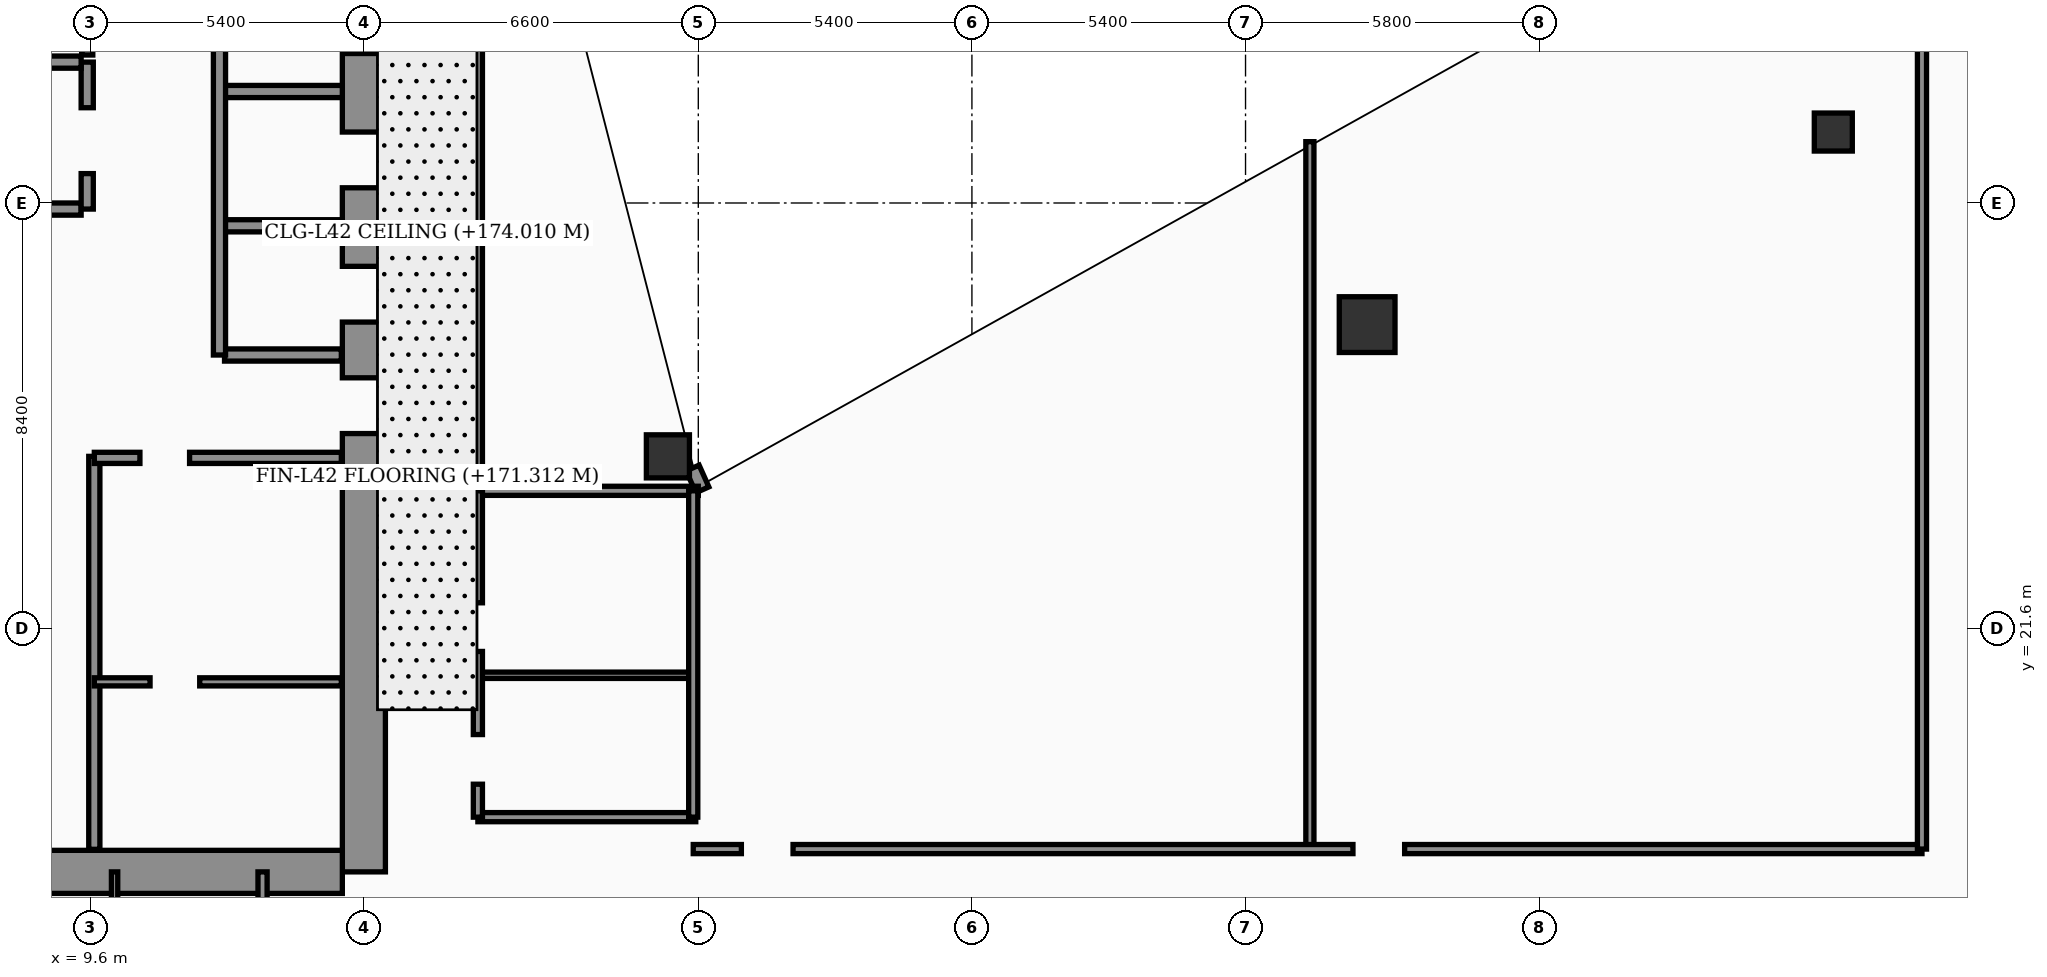
"""IFC4 building model, lengths in metres.
Left out: names, types, materials, properties, quantities, classifications, styles, units other than length and angle.
Written with IfcOpenShell. Run it as: python <this file> out.ifc"""

import sys

from ifc_helpers import new_model, si_unit, direction, frame, frame_2d, origin, origin_2d, place, context, subcontext, project, spatial, rectangle, hollow_rectangle, circle, extrude, element, fill, save


model = new_model("IFC4")
c1 = context("Model", 3, precision=1e-05, world=origin(), true_north=direction((0.0, 1.0)))
c2 = subcontext(c1, "Body", "Model", "MODEL_VIEW")
j1 = project(units=[si_unit("LENGTHUNIT", "METRE"), si_unit("PLANEANGLEUNIT", "RADIAN")], contexts=[c1])
p1 = place(None, origin())
s1 = spatial("IfcSite", under=j1, at=p1, CompositionType="ELEMENT")
p2 = place(p1, origin())
s2 = spatial("IfcBuilding", under=s1, at=p2, CompositionType="ELEMENT")
p3 = place(p2, frame((0.0, 0.0, 171.3)))
s3 = spatial("IfcBuildingStorey", under=s2, at=p3, CompositionType="ELEMENT", Elevation=171.3)
p4 = place(p3, frame((15.0, 16.8, 0.0), z_axis=(0.0, 0.0, 1.0), x_axis=(0.0, 1.0, 0.0)))
e1 = element("IfcWall", 1, at=p4, inside=s3, PredefinedType="SHEAR", context=c2, shape_type="SweptSolid", body=[
    extrude(rectangle(XDim=21.6, YDim=0.85, at=frame_2d((10.8, 0.0))), origin(), (0.0, 0.0, 1.0), 3.56),
])
p5 = place(p4, frame((8.65, 0.0, 0.0)))
e2 = element("IfcOpeningElement", 2, at=p5, cuts=e1, PredefinedType="OPENING", context=c2, shape_type="SweptSolid", body=[
    extrude(rectangle(XDim=1.1, YDim=2.2, at=frame_2d((0.55, 1.1))), frame((0.0, 0.435, 0.0), z_axis=(0.0, -1.0, 0.0), x_axis=(1.0, 0.0, 0.0)), (0.0, 0.0, 1.0), 0.87),
])
p6 = place(p4, frame((10.85, 0.0, 0.0)))
e3 = element("IfcOpeningElement", 3, at=p6, cuts=e1, PredefinedType="OPENING", context=c2, shape_type="SweptSolid", body=[
    extrude(rectangle(XDim=1.1, YDim=2.2, at=frame_2d((0.55, 1.1))), frame((0.0, 0.435, 0.0), z_axis=(0.0, -1.0, 0.0), x_axis=(1.0, 0.0, 0.0)), (0.0, 0.0, 1.0), 0.87),
])
p7 = place(p4, frame((13.5, 0.0, 0.0)))
e4 = element("IfcOpeningElement", 4, at=p7, cuts=e1, PredefinedType="OPENING", context=c2, shape_type="SweptSolid", body=[
    extrude(rectangle(XDim=1.1, YDim=2.2, at=frame_2d((0.55, 1.1))), frame((0.0, 0.435, 0.0), z_axis=(0.0, -1.0, 0.0), x_axis=(1.0, 0.0, 0.0)), (0.0, 0.0, 1.0), 0.87),
])
p8 = place(p4, frame((16.15, 0.0, 0.0)))
e5 = element("IfcOpeningElement", 5, at=p8, cuts=e1, PredefinedType="OPENING", context=c2, shape_type="SweptSolid", body=[
    extrude(rectangle(XDim=1.1, YDim=2.2, at=frame_2d((0.55, 1.1))), frame((0.0, 0.435, 0.0), z_axis=(0.0, -1.0, 0.0), x_axis=(1.0, 0.0, 0.0)), (0.0, 0.0, 1.0), 0.87),
])
p9 = place(p3, frame((4.625, 16.8, 0.0), z_axis=(0.0, 0.0, 1.0), x_axis=(1.0, 0.0, 0.0)))
e6 = element("IfcWall", 6, at=p9, inside=s3, PredefinedType="SHEAR", context=c2, shape_type="SweptSolid", body=[
    extrude(rectangle(XDim=9.95, YDim=0.85, at=frame_2d((4.975, 0.0))), origin(), (0.0, 0.0, 1.0), 3.56),
])
for number, where, z_axis, x_axis in (
    (7, (12.18, 29.55, 0.0), (0.0, 0.0, 1.0), (1.0, 0.0, 0.0)),
    (8, (12.18, 32.2, 0.0), (0.0, 0.0, 1.0), (1.0, 0.0, 0.0)),
):
    element("IfcWall", number, at=place(p3, frame(where, z_axis=z_axis, x_axis=x_axis)), inside=s3, PredefinedType="SOLIDWALL", context=c2, shape_type="SweptSolid", body=[
        extrude(rectangle(XDim=2.395, YDim=0.24, at=frame_2d((1.198, 0.0))), origin(), (0.0, 0.0, 1.0), 3.56),
    ])
p10 = place(p3, frame((21.0, 25.0, 0.0), z_axis=(0.0, 0.0, 1.0), x_axis=(1.0, 0.0, 0.0)))
e9 = element("IfcColumn", 9, at=p10, inside=s3, PredefinedType="COLUMN", context=c2, shape_type="SweptSolid", body=[
    extrude(hollow_rectangle(XDim=0.85, YDim=0.85, WallThickness=0.036, at=origin_2d()), origin(), (0.0, 0.0, 1.0), 3.56),
])
p11 = place(p3, frame((34.8, 27.6, 0.0), z_axis=(0.0, 0.0, 1.0), x_axis=(1.0, 0.0, 0.0)))
e10 = element("IfcColumn", 10, at=p11, inside=s3, PredefinedType="COLUMN", context=c2, shape_type="SweptSolid", body=[
    extrude(circle(Radius=0.55, at=origin_2d()), origin(), (0.0, 0.0, 1.0), 3.56),
])
p12 = place(p3, frame((44.0, 31.4, 0.0), z_axis=(0.0, 0.0, 1.0), x_axis=(1.0, 0.0, 0.0)))
e11 = element("IfcColumn", 11, at=p12, inside=s3, PredefinedType="COLUMN", context=c2, shape_type="SweptSolid", body=[
    extrude(hollow_rectangle(XDim=0.75, YDim=0.75, WallThickness=0.032, at=origin_2d()), origin(), (0.0, 0.0, 1.0), 3.56),
])
p13 = place(p3, frame((21.68, 24.34, 0.0), z_axis=(0.0, 0.0, 1.0), x_axis=(-0.40758134973, 0.913168901875, 0.0)))
e12 = element("IfcWall", 12, at=p13, inside=s3, PredefinedType="SOLIDWALL", context=c2, shape_type="SweptSolid", body=[
    extrude(rectangle(XDim=0.471, YDim=0.28, at=frame_2d((0.235, 0.0))), origin(), (0.0, 0.0, 1.0), 3.56),
])
p14 = place(p3, frame((4.645, 29.88, 0.0), z_axis=(0.0, 0.0, 1.0), x_axis=(1.0, 0.0, 0.0)))
e13 = element("IfcWall", 13, at=p14, inside=s3, PredefinedType="SOLIDWALL", context=c2, shape_type="SweptSolid", body=[
    extrude(rectangle(XDim=4.775, YDim=0.24, at=frame_2d((2.387, 0.0))), origin(), (0.0, 0.0, 1.0), 3.56),
])
p15 = place(p14, frame((0.45, 0.0, 0.0)))
e14 = element("IfcOpeningElement", 14, at=p15, cuts=e13, PredefinedType="OPENING", context=c2, shape_type="SweptSolid", body=[
    extrude(rectangle(XDim=1.3, YDim=2.35, at=frame_2d((0.65, 1.175))), frame((0.0, 0.13, 0.0), z_axis=(0.0, -1.0, 0.0), x_axis=(1.0, 0.0, 0.0)), (0.0, 0.0, 1.0), 0.26),
])
p16 = place(p3, frame((9.54, 29.88, 0.0), z_axis=(0.0, 0.0, 1.0), x_axis=(0.0, 1.0, 0.0)))
e15 = element("IfcWall", 15, at=p16, inside=s3, PredefinedType="SOLIDWALL", context=c2, shape_type="SweptSolid", body=[
    extrude(rectangle(XDim=2.9, YDim=0.24, at=frame_2d((1.45, 0.0))), origin(), (0.0, 0.0, 1.0), 3.56),
])
p17 = place(p16, frame((0.7, 0.0, 0.0)))
e16 = element("IfcOpeningElement", 16, at=p17, cuts=e15, PredefinedType="OPENING", context=c2, shape_type="SweptSolid", body=[
    extrude(rectangle(XDim=1.3, YDim=2.35, at=frame_2d((0.65, 1.175))), frame((0.0, 0.13, 0.0), z_axis=(0.0, -1.0, 0.0), x_axis=(1.0, 0.0, 0.0)), (0.0, 0.0, 1.0), 0.26),
])
p18 = place(p3, frame((4.645, 32.78, 0.0), z_axis=(0.0, 0.0, 1.0), x_axis=(1.0, 0.0, 0.0)))
e17 = element("IfcWall", 17, at=p18, inside=s3, PredefinedType="SOLIDWALL", context=c2, shape_type="SweptSolid", body=[
    extrude(rectangle(XDim=4.775, YDim=0.24, at=frame_2d((2.387, 0.0))), origin(), (0.0, 0.0, 1.0), 3.19),
])
p19 = place(p3, frame((9.68, 17.245, 0.0), z_axis=(0.0, 0.0, 1.0), x_axis=(0.0, 1.0, 0.0)))
e18 = element("IfcWall", 18, at=p19, inside=s3, PredefinedType="SOLIDWALL", context=c2, shape_type="SweptSolid", body=[
    extrude(rectangle(XDim=7.755, YDim=0.22, at=frame_2d((3.877, 0.0))), origin(), (0.0, 0.0, 1.0), 3.56),
])
p20 = place(p3, frame((9.54, 32.92, 0.0), z_axis=(0.0, 0.0, 1.0), x_axis=(0.0, 1.0, 0.0)))
e19 = element("IfcWall", 19, at=p20, inside=s3, PredefinedType="SOLIDWALL", context=c2, shape_type="SweptSolid", body=[
    extrude(rectangle(XDim=5.035, YDim=0.22, at=frame_2d((2.518, 0.0))), origin(), (0.0, 0.0, 1.0), 3.56),
])
p21 = place(p20, frame((0.65, 0.0, 0.0)))
e20 = element("IfcOpeningElement", 20, at=p21, cuts=e19, PredefinedType="OPENING", context=c2, shape_type="SweptSolid", body=[
    extrude(rectangle(XDim=0.98, YDim=2.15, at=frame_2d((0.49, 1.075))), frame((0.0, 0.12, 0.0), z_axis=(0.0, -1.0, 0.0), x_axis=(1.0, 0.0, 0.0)), (0.0, 0.0, 1.0), 0.24),
])
p22 = place(p3, frame((9.68, 20.55, 0.0), z_axis=(0.0, 0.0, 1.0), x_axis=(1.0, 0.0, 0.0)))
e21 = element("IfcWall", 21, at=p22, inside=s3, PredefinedType="PARTITIONING", context=c2, shape_type="SweptSolid", body=[
    extrude(rectangle(XDim=4.875, YDim=0.16, at=frame_2d((2.438, 0.0))), origin(), (0.0, 0.0, 1.0), 3.56),
])
p23 = place(p22, frame((1.1, 0.0, 0.0)))
e22 = element("IfcOpeningElement", 22, at=p23, cuts=e21, PredefinedType="OPENING", context=c2, shape_type="SweptSolid", body=[
    extrude(rectangle(XDim=0.98, YDim=2.15, at=frame_2d((0.49, 1.075))), frame((0.0, 0.09, 0.0), z_axis=(0.0, -1.0, 0.0), x_axis=(1.0, 0.0, 0.0)), (0.0, 0.0, 1.0), 0.18),
])
p24 = place(p3, frame((9.68, 24.97, 0.0), z_axis=(0.0, 0.0, 1.0), x_axis=(1.0, 0.0, 0.0)))
e23 = element("IfcWall", 23, at=p24, inside=s3, PredefinedType="SOLIDWALL", context=c2, shape_type="SweptSolid", body=[
    extrude(rectangle(XDim=4.875, YDim=0.22, at=frame_2d((2.438, 0.0))), origin(), (0.0, 0.0, 1.0), 2.94),
])
p25 = place(p24, frame((0.9, 0.0, 0.0)))
e24 = element("IfcOpeningElement", 24, at=p25, cuts=e23, PredefinedType="OPENING", context=c2, shape_type="SweptSolid", body=[
    extrude(rectangle(XDim=0.98, YDim=2.15, at=frame_2d((0.49, 1.075))), frame((0.0, 0.12, 0.0), z_axis=(0.0, -1.0, 0.0), x_axis=(1.0, 0.0, 0.0)), (0.0, 0.0, 1.0), 0.24),
])
p26 = place(p3, frame((12.25, 27.0, 0.0), z_axis=(0.0, 0.0, 1.0), x_axis=(1.0, 0.0, 0.0)))
e25 = element("IfcWall", 25, at=p26, inside=s3, PredefinedType="SOLIDWALL", context=c2, shape_type="SweptSolid", body=[
    extrude(rectangle(XDim=2.305, YDim=0.24, at=frame_2d((1.152, 0.0))), origin(), (0.0, 0.0, 1.0), 3.56),
])
p27 = place(p3, frame((12.15, 27.0, 0.0), z_axis=(0.0, 0.0, 1.0), x_axis=(0.0, 1.0, 0.0)))
e26 = element("IfcWall", 26, at=p27, inside=s3, PredefinedType="SOLIDWALL", context=c2, shape_type="SweptSolid", body=[
    extrude(rectangle(XDim=7.75, YDim=0.24, at=frame_2d((3.875, 0.0))), origin(), (0.0, 0.0, 1.0), 3.56),
])
p28 = place(p3, frame((10.08, 14.75, 0.0), z_axis=(0.0, 0.0, 1.0), x_axis=(0.0, 1.0, 0.0)))
e27 = element("IfcWall", 27, at=p28, inside=s3, PredefinedType="PARTITIONING", context=c2, shape_type="SweptSolid", body=[
    extrude(rectangle(XDim=2.05, YDim=0.125, at=frame_2d((1.025, 0.0))), origin(), (0.0, 0.0, 1.0), 3.56),
])
p29 = place(p3, frame((13.0, 2.44, 0.0), z_axis=(0.0, 0.0, 1.0), x_axis=(0.0, 1.0, 0.0)))
e28 = element("IfcWall", 28, at=p29, inside=s3, PredefinedType="PARTITIONING", context=c2, shape_type="SweptSolid", body=[
    extrude(rectangle(XDim=14.36, YDim=0.18, at=frame_2d((7.18, 0.0))), origin(), (0.0, 0.0, 1.0), 2.94),
])
p30 = place(p29, frame((3.01, 0.0, 0.0)))
e29 = element("IfcOpeningElement", 29, at=p30, cuts=e28, PredefinedType="OPENING", context=c2, shape_type="SweptSolid", body=[
    extrude(rectangle(XDim=1.02, YDim=2.2, at=frame_2d((0.51, 1.1))), frame((0.0, 0.1, 0.0), z_axis=(0.0, -1.0, 0.0), x_axis=(1.0, 0.0, 0.0)), (0.0, 0.0, 1.0), 0.2),
])
p31 = place(p29, frame((10.1, 0.0, 0.0)))
e30 = element("IfcOpeningElement", 30, at=p31, cuts=e28, PredefinedType="OPENING", context=c2, shape_type="SweptSolid", body=[
    extrude(rectangle(XDim=1.02, YDim=2.2, at=frame_2d((0.51, 1.1))), frame((0.0, 0.1, 0.0), z_axis=(0.0, -1.0, 0.0), x_axis=(1.0, 0.0, 0.0)), (0.0, 0.0, 1.0), 0.2),
])
p32 = place(p3, frame((17.25, 24.3, 0.0), z_axis=(0.0, 0.0, 1.0), x_axis=(0.0, 1.0, 0.0)))
e31 = element("IfcWall", 31, at=p32, inside=s3, PredefinedType="PARTITIONING", context=c2, shape_type="SweptSolid", body=[
    extrude(rectangle(XDim=17.65, YDim=0.18, at=frame_2d((8.825, 0.0))), origin(), (0.0, 0.0, 1.0), 2.94),
])
p33 = place(p3, frame((17.25, 17.88, 0.0), z_axis=(0.0, 0.0, 1.0), x_axis=(1.0, 0.0, 0.0)))
e32 = element("IfcWall", 32, at=p33, inside=s3, PredefinedType="PARTITIONING", context=c2, shape_type="SweptSolid", body=[
    extrude(rectangle(XDim=4.3, YDim=0.18, at=frame_2d((2.15, 0.0))), origin(), (0.0, 0.0, 1.0), 3.09),
])
p34 = place(p3, frame((17.25, 20.68, 0.0), z_axis=(0.0, 0.0, 1.0), x_axis=(1.0, 0.0, 0.0)))
e33 = element("IfcWall", 33, at=p34, inside=s3, PredefinedType="PARTITIONING", context=c2, shape_type="SweptSolid", body=[
    extrude(rectangle(XDim=4.3, YDim=0.125, at=frame_2d((2.15, 0.0))), origin(), (0.0, 0.0, 1.0), 3.56),
])
p35 = place(p3, frame((17.25, 24.32, 0.0), z_axis=(0.0, 0.0, 1.0), x_axis=(1.0, 0.0, 0.0)))
e34 = element("IfcWall", 34, at=p35, inside=s3, PredefinedType="PARTITIONING", context=c2, shape_type="SweptSolid", body=[
    extrude(rectangle(XDim=4.35, YDim=0.18, at=frame_2d((2.175, 0.0))), origin(), (0.0, 0.0, 1.0), 3.56),
])
p36 = place(p3, frame((21.5, 17.88, 0.0), z_axis=(0.0, 0.0, 1.0), x_axis=(0.0, 1.0, 0.0)))
e35 = element("IfcWall", 35, at=p36, inside=s3, PredefinedType="PARTITIONING", context=c2, shape_type="SweptSolid", body=[
    extrude(rectangle(XDim=6.44, YDim=0.18, at=frame_2d((3.22, 0.0))), origin(), (0.0, 0.0, 1.0), 3.09),
])
p37 = place(p3, frame((17.25, 17.88, 0.0), z_axis=(0.0, 0.0, 1.0), x_axis=(0.0, 1.0, 0.0)))
e36 = element("IfcWall", 36, at=p37, inside=s3, PredefinedType="PARTITIONING", context=c2, shape_type="SweptSolid", body=[
    extrude(rectangle(XDim=6.44, YDim=0.18, at=frame_2d((3.22, 0.0))), origin(), (0.0, 0.0, 1.0), 3.09),
])
p38 = place(p37, frame((0.65, 0.0, 0.0)))
e37 = element("IfcOpeningElement", 37, at=p38, cuts=e36, PredefinedType="OPENING", context=c2, shape_type="SweptSolid", body=[
    extrude(rectangle(XDim=0.98, YDim=2.15, at=frame_2d((0.49, 1.075))), frame((0.0, 0.1, 0.0), z_axis=(0.0, -1.0, 0.0), x_axis=(1.0, 0.0, 0.0)), (0.0, 0.0, 1.0), 0.2),
])
p39 = place(p37, frame((3.27, 0.0, 0.0)))
e38 = element("IfcOpeningElement", 38, at=p39, cuts=e36, PredefinedType="OPENING", context=c2, shape_type="SweptSolid", body=[
    extrude(rectangle(XDim=0.96, YDim=2.2, at=frame_2d((0.48, 1.1))), frame((0.0, 0.1, 0.0), z_axis=(0.0, -1.0, 0.0), x_axis=(1.0, 0.0, 0.0)), (0.0, 0.0, 1.0), 0.2),
])
p40 = place(p3, frame((33.67, 17.25, 0.0), z_axis=(0.0, 0.0, 1.0), x_axis=(0.0, 1.0, 0.0)))
e39 = element("IfcWall", 39, at=p40, inside=s3, PredefinedType="PARTITIONING", context=c2, shape_type="SweptSolid", body=[
    extrude(rectangle(XDim=13.96, YDim=0.16, at=frame_2d((6.98, 0.0))), origin(), (0.0, 0.0, 1.0), 2.94),
])
p41 = place(p3, frame((21.5, 17.25, 0.0), z_axis=(0.0, 0.0, 1.0), x_axis=(1.0, 0.0, 0.0)))
e40 = element("IfcWall", 40, at=p41, inside=s3, PredefinedType="PARTITIONING", context=c2, shape_type="SweptSolid", body=[
    extrude(rectangle(XDim=24.25, YDim=0.18, at=frame_2d((12.125, 0.0))), origin(), (0.0, 0.0, 1.0), 2.94),
])
p42 = place(p41, frame((0.95, 0.0, 0.0)))
e41 = element("IfcOpeningElement", 41, at=p42, cuts=e40, PredefinedType="OPENING", context=c2, shape_type="SweptSolid", body=[
    extrude(rectangle(XDim=1.02, YDim=2.2, at=frame_2d((0.51, 1.1))), frame((0.0, 0.1, 0.0), z_axis=(0.0, -1.0, 0.0), x_axis=(1.0, 0.0, 0.0)), (0.0, 0.0, 1.0), 0.2),
])
p43 = place(p41, frame((13.02, 0.0, 0.0)))
e42 = element("IfcOpeningElement", 42, at=p43, cuts=e40, PredefinedType="OPENING", context=c2, shape_type="SweptSolid", body=[
    extrude(rectangle(XDim=1.02, YDim=2.2, at=frame_2d((0.51, 1.1))), frame((0.0, 0.1, 0.0), z_axis=(0.0, -1.0, 0.0), x_axis=(1.0, 0.0, 0.0)), (0.0, 0.0, 1.0), 0.2),
])
p44 = place(p3, frame((45.75, 17.25, 0.0), z_axis=(0.0, 0.0, 1.0), x_axis=(0.0, 1.0, 0.0)))
e43 = element("IfcWall", 43, at=p44, inside=s3, PredefinedType="PARTITIONING", context=c2, shape_type="SweptSolid", body=[
    extrude(rectangle(XDim=20.69, YDim=0.18, at=frame_2d((10.345, 0.0))), origin(), (0.0, 0.0, 1.0), 2.94),
])
p45 = place(p17, origin())
e44 = element("IfcDoor", 44, at=p45, inside=s3, OperationType="DOUBLE_DOOR_SLIDING", PredefinedType="DOOR", context=c2, shape_type="SweptSolid", body=[
    extrude(rectangle(XDim=1.3, YDim=2.35, at=frame_2d((0.65, 1.175))), frame((0.0, 0.025, 0.0), z_axis=(0.0, -1.0, 0.0), x_axis=(1.0, 0.0, 0.0)), (0.0, 0.0, 1.0), 0.05),
])
fill(e16, e44)
p46 = place(p23, origin())
e45 = element("IfcDoor", 45, at=p46, inside=s3, OperationType="SINGLE_SWING_LEFT", PredefinedType="DOOR", context=c2, shape_type="SweptSolid", body=[
    extrude(rectangle(XDim=0.98, YDim=2.15, at=frame_2d((0.49, 1.075))), frame((0.0, 0.025, 0.0), z_axis=(0.0, -1.0, 0.0), x_axis=(1.0, 0.0, 0.0)), (0.0, 0.0, 1.0), 0.05),
])
fill(e22, e45)
p47 = place(p25, origin())
e46 = element("IfcDoor", 46, at=p47, inside=s3, OperationType="SINGLE_SWING_RIGHT", PredefinedType="DOOR", context=c2, shape_type="SweptSolid", body=[
    extrude(rectangle(XDim=0.98, YDim=2.15, at=frame_2d((0.49, 1.075))), frame((0.0, 0.025, 0.0), z_axis=(0.0, -1.0, 0.0), x_axis=(1.0, 0.0, 0.0)), (0.0, 0.0, 1.0), 0.05),
])
fill(e24, e46)
p48 = place(p38, origin())
e47 = element("IfcDoor", 47, at=p48, inside=s3, OperationType="SINGLE_SWING_LEFT", PredefinedType="DOOR", context=c2, shape_type="SweptSolid", body=[
    extrude(rectangle(XDim=0.98, YDim=2.15, at=frame_2d((0.49, 1.075))), frame((0.0, 0.025, 0.0), z_axis=(0.0, -1.0, 0.0), x_axis=(1.0, 0.0, 0.0)), (0.0, 0.0, 1.0), 0.05),
])
fill(e37, e47)
p49 = place(p39, origin())
e48 = element("IfcDoor", 48, at=p49, inside=s3, OperationType="SINGLE_SWING_RIGHT", PredefinedType="DOOR", context=c2, shape_type="SweptSolid", body=[
    extrude(rectangle(XDim=0.96, YDim=2.2, at=frame_2d((0.48, 1.1))), frame((0.0, 0.025, 0.0), z_axis=(0.0, -1.0, 0.0), x_axis=(1.0, 0.0, 0.0)), (0.0, 0.0, 1.0), 0.05),
])
fill(e38, e48)
p50 = place(p42, origin())
e49 = element("IfcDoor", 49, at=p50, inside=s3, OperationType="SINGLE_SWING_RIGHT", PredefinedType="DOOR", context=c2, shape_type="SweptSolid", body=[
    extrude(rectangle(XDim=1.02, YDim=2.2, at=frame_2d((0.51, 1.1))), frame((0.0, 0.025, 0.0), z_axis=(0.0, -1.0, 0.0), x_axis=(1.0, 0.0, 0.0)), (0.0, 0.0, 1.0), 0.05),
])
fill(e41, e49)
p51 = place(p43, origin())
e50 = element("IfcDoor", 50, at=p51, inside=s3, OperationType="SINGLE_SWING_LEFT", PredefinedType="DOOR", context=c2, shape_type="SweptSolid", body=[
    extrude(rectangle(XDim=1.02, YDim=2.2, at=frame_2d((0.51, 1.1))), frame((0.0, 0.025, 0.0), z_axis=(0.0, -1.0, 0.0), x_axis=(1.0, 0.0, 0.0)), (0.0, 0.0, 1.0), 0.05),
])
fill(e42, e50)
p52 = place(p5, origin())
e51 = element("IfcDoor", 51, at=p52, inside=s3, OperationType="SINGLE_SWING_LEFT", PredefinedType="DOOR", context=c2, shape_type="SweptSolid", body=[
    extrude(rectangle(XDim=1.1, YDim=2.2, at=frame_2d((0.55, 1.1))), frame((0.0, 0.025, 0.0), z_axis=(0.0, -1.0, 0.0), x_axis=(1.0, 0.0, 0.0)), (0.0, 0.0, 1.0), 0.05),
])
fill(e2, e51)
p53 = place(p6, origin())
e52 = element("IfcDoor", 52, at=p53, inside=s3, OperationType="DOUBLE_DOOR_SLIDING", PredefinedType="DOOR", context=c2, shape_type="SweptSolid", body=[
    extrude(rectangle(XDim=1.1, YDim=2.2, at=frame_2d((0.55, 1.1))), frame((0.0, 0.025, 0.0), z_axis=(0.0, -1.0, 0.0), x_axis=(1.0, 0.0, 0.0)), (0.0, 0.0, 1.0), 0.05),
])
fill(e3, e52)
p54 = place(p7, origin())
e53 = element("IfcDoor", 53, at=p54, inside=s3, OperationType="DOUBLE_DOOR_SLIDING", PredefinedType="DOOR", context=c2, shape_type="SweptSolid", body=[
    extrude(rectangle(XDim=1.1, YDim=2.2, at=frame_2d((0.55, 1.1))), frame((0.0, 0.025, 0.0), z_axis=(0.0, -1.0, 0.0), x_axis=(1.0, 0.0, 0.0)), (0.0, 0.0, 1.0), 0.05),
])
fill(e4, e53)
p55 = place(p8, origin())
e54 = element("IfcDoor", 54, at=p55, inside=s3, OperationType="DOUBLE_DOOR_SLIDING", PredefinedType="DOOR", context=c2, shape_type="SweptSolid", body=[
    extrude(rectangle(XDim=1.1, YDim=2.2, at=frame_2d((0.55, 1.1))), frame((0.0, 0.025, 0.0), z_axis=(0.0, -1.0, 0.0), x_axis=(1.0, 0.0, 0.0)), (0.0, 0.0, 1.0), 0.05),
])
fill(e5, e54)
save(model, sys.argv[1])
